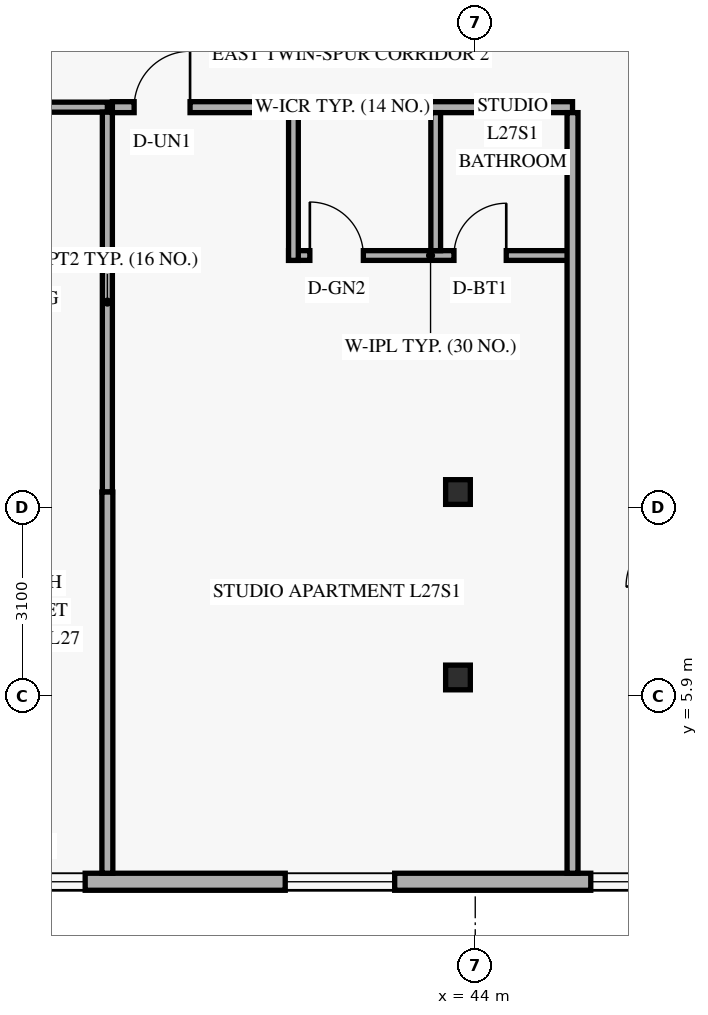
"""IFC4 building model, lengths in metres.
Left out: names, types, materials, properties, quantities, classifications, styles, units other than length and angle.
Written with IfcOpenShell. Run it as: python <this file> out.ifc"""

import sys

from ifc_helpers import new_model, si_unit, direction, frame, frame_2d, origin, origin_2d, place, context, subcontext, project, spatial, rectangle, hollow_rectangle, extrude, element, fill, save


model = new_model("IFC4")
c1 = context("Model", 3, precision=1e-05, world=origin(), true_north=direction((0.0, 1.0)))
c2 = subcontext(c1, "Body", "Model", "MODEL_VIEW")
j1 = project(units=[si_unit("LENGTHUNIT", "METRE"), si_unit("PLANEANGLEUNIT", "RADIAN")], contexts=[c1])
p1 = place(None, origin())
s1 = spatial("IfcSite", under=j1, at=p1, CompositionType="ELEMENT")
p2 = place(p1, origin())
s2 = spatial("IfcBuilding", under=s1, at=p2, CompositionType="ELEMENT")
p3 = place(p2, frame((0.0, 0.0, 106.2)))
s3 = spatial("IfcBuildingStorey", under=s2, at=p3, CompositionType="ELEMENT", Elevation=106.2)
for number, where, z_axis, x_axis in (
    (1, (43.653, 6.2, 0.0), (0.035, 0.0, 0.999), (0.0, 1.0, 0.0)),
    (2, (43.653, 9.25, 0.0), (0.035, 0.0, 0.999), (0.0, 1.0, 0.0)),
):
    element("IfcColumn", number, at=place(p3, frame(where, z_axis=z_axis, x_axis=x_axis)), inside=s3, PredefinedType="COLUMN", context=c2, shape_type="SweptSolid", body=[
        extrude(hollow_rectangle(XDim=0.406, YDim=0.406, WallThickness=0.016, at=origin_2d()), origin(), (0.0, 0.0, 1.0), 3.602),
    ])
p4 = place(p3, frame((13.42, 2.84, 0.0), z_axis=(0.0, 0.0, 1.0), x_axis=(1.0, 0.0, 0.0)))
e3 = element("IfcWall", 3, at=p4, inside=s3, PredefinedType="SOLIDWALL", context=c2, shape_type="SweptSolid", body=[
    extrude(rectangle(XDim=36.56, YDim=0.28, at=frame_2d((18.28, 0.0))), origin(), (0.0, 0.0, 1.0), 3.36),
])
p5 = place(p4, frame((3.215, 0.0, 0.85)))
e4 = element("IfcOpeningElement", 4, at=p5, cuts=e3, PredefinedType="OPENING", context=c2, shape_type="SweptSolid", body=[
    extrude(rectangle(XDim=1.8, YDim=1.6, at=frame_2d((0.9, 0.8))), frame((0.0, 0.15, 0.0), z_axis=(0.0, -1.0, 0.0), x_axis=(1.0, 0.0, 0.0)), (0.0, 0.0, 1.0), 0.3),
])
p6 = place(p4, frame((10.055, 0.0, 0.85)))
e5 = element("IfcOpeningElement", 5, at=p6, cuts=e3, PredefinedType="OPENING", context=c2, shape_type="SweptSolid", body=[
    extrude(rectangle(XDim=1.8, YDim=1.6, at=frame_2d((0.9, 0.8))), frame((0.0, 0.15, 0.0), z_axis=(0.0, -1.0, 0.0), x_axis=(1.0, 0.0, 0.0)), (0.0, 0.0, 1.0), 0.3),
])
p7 = place(p4, frame((16.94, 0.0, 0.85)))
e6 = element("IfcOpeningElement", 6, at=p7, cuts=e3, PredefinedType="OPENING", context=c2, shape_type="SweptSolid", body=[
    extrude(rectangle(XDim=1.8, YDim=1.6, at=frame_2d((0.9, 0.8))), frame((0.0, 0.15, 0.0), z_axis=(0.0, -1.0, 0.0), x_axis=(1.0, 0.0, 0.0)), (0.0, 0.0, 1.0), 0.3),
])
p8 = place(p4, frame((22.365, 0.0, 0.85)))
e7 = element("IfcOpeningElement", 7, at=p8, cuts=e3, PredefinedType="OPENING", context=c2, shape_type="SweptSolid", body=[
    extrude(rectangle(XDim=1.8, YDim=1.6, at=frame_2d((0.9, 0.8))), frame((0.0, 0.15, 0.0), z_axis=(0.0, -1.0, 0.0), x_axis=(1.0, 0.0, 0.0)), (0.0, 0.0, 1.0), 0.3),
])
p9 = place(p4, frame((27.455, 0.0, 0.85)))
e8 = element("IfcOpeningElement", 8, at=p9, cuts=e3, PredefinedType="OPENING", context=c2, shape_type="SweptSolid", body=[
    extrude(rectangle(XDim=1.8, YDim=1.6, at=frame_2d((0.9, 0.8))), frame((0.0, 0.15, 0.0), z_axis=(0.0, -1.0, 0.0), x_axis=(1.0, 0.0, 0.0)), (0.0, 0.0, 1.0), 0.3),
])
p10 = place(p4, frame((32.48, 0.0, 0.85)))
e9 = element("IfcOpeningElement", 9, at=p10, cuts=e3, PredefinedType="OPENING", context=c2, shape_type="SweptSolid", body=[
    extrude(rectangle(XDim=1.2, YDim=1.5, at=frame_2d((0.6, 0.75))), frame((0.0, 0.15, 0.0), z_axis=(0.0, -1.0, 0.0), x_axis=(1.0, 0.0, 0.0)), (0.0, 0.0, 1.0), 0.3),
])
p11 = place(p4, frame((34.37, 0.0, 0.85)))
e10 = element("IfcOpeningElement", 10, at=p11, cuts=e3, PredefinedType="OPENING", context=c2, shape_type="SweptSolid", body=[
    extrude(rectangle(XDim=1.8, YDim=1.6, at=frame_2d((0.9, 0.8))), frame((0.0, 0.15, 0.0), z_axis=(0.0, -1.0, 0.0), x_axis=(1.0, 0.0, 0.0)), (0.0, 0.0, 1.0), 0.3),
])
p12 = place(p3, frame((32.732, 15.58, 0.0), z_axis=(0.0, 0.0, 1.0), x_axis=(1.0, 0.0, 0.0)))
e11 = element("IfcWall", 11, at=p12, inside=s3, PredefinedType="PARTITIONING", context=c2, shape_type="SweptSolid", body=[
    extrude(rectangle(XDim=5.218, YDim=0.165, at=frame_2d((2.609, 0.0))), origin(), (0.0, 0.0, 1.0), 2.731),
])
p13 = place(p12, frame((2.867, 0.0, 0.0)))
e12 = element("IfcOpeningElement", 12, at=p13, cuts=e11, PredefinedType="OPENING", context=c2, shape_type="SweptSolid", body=[
    extrude(rectangle(XDim=0.95, YDim=2.15, at=frame_2d((0.475, 1.075))), frame((0.0, 0.093, 0.0), z_axis=(0.0, -1.0, 0.0), x_axis=(1.0, 0.0, 0.0)), (0.0, 0.0, 1.0), 0.185),
])
p14 = place(p3, frame((37.95, 9.25, 0.0), z_axis=(0.0, 0.0, 1.0), x_axis=(0.0, 1.0, 0.0)))
e13 = element("IfcWall", 13, at=p14, inside=s3, PredefinedType="PARTITIONING", context=c2, shape_type="SweptSolid", body=[
    extrude(rectangle(XDim=6.248, YDim=0.165, at=frame_2d((3.124, 0.0))), origin(), (0.0, 0.0, 1.0), 2.731),
])
p15 = place(p3, frame((38.032, 15.58, 0.0), z_axis=(0.0, 0.0, 1.0), x_axis=(1.0, 0.0, 0.0)))
e14 = element("IfcWall", 14, at=p15, inside=s3, PredefinedType="STANDARD", context=c2, shape_type="SweptSolid", body=[
    extrude(rectangle(XDim=7.568, YDim=0.18, at=frame_2d((3.784, 0.0))), origin(), (0.0, 0.0, 1.0), 2.731),
])
p16 = place(p15, frame((0.357, 0.0, 0.0)))
e15 = element("IfcOpeningElement", 15, at=p16, cuts=e14, PredefinedType="OPENING", context=c2, shape_type="SweptSolid", body=[
    extrude(rectangle(XDim=0.92, YDim=2.15, at=frame_2d((0.46, 1.075))), frame((0.0, 0.1, 0.0), z_axis=(0.0, -1.0, 0.0), x_axis=(1.0, 0.0, 0.0)), (0.0, 0.0, 1.0), 0.2),
])
p17 = place(p3, frame((37.95, 2.98, 0.0), z_axis=(0.0, 0.0, 1.0), x_axis=(0.0, 1.0, 0.0)))
e16 = element("IfcWall", 16, at=p17, inside=s3, PredefinedType="PARTITIONING", context=c2, shape_type="SweptSolid", body=[
    extrude(rectangle(XDim=6.27, YDim=0.18, at=frame_2d((3.135, 0.0))), origin(), (0.0, 0.0, 1.0), 2.731),
])
p18 = place(p3, frame((40.93, 13.14, 0.0), z_axis=(0.0, 0.0, 1.0), x_axis=(1.0, 0.0, 0.0)))
e17 = element("IfcWall", 17, at=p18, inside=s3, PredefinedType="PLUMBINGWALL", context=c2, shape_type="SweptSolid", body=[
    extrude(rectangle(XDim=4.67, YDim=0.16, at=frame_2d((2.335, 0.0))), origin(), (0.0, 0.0, 1.0), 2.731),
])
p19 = place(p18, frame((0.35, 0.0, 0.0)))
e18 = element("IfcOpeningElement", 18, at=p19, cuts=e17, PredefinedType="OPENING", context=c2, shape_type="SweptSolid", body=[
    extrude(rectangle(XDim=0.88, YDim=2.12, at=frame_2d((0.44, 1.06))), frame((0.0, 0.09, 0.0), z_axis=(0.0, -1.0, 0.0), x_axis=(1.0, 0.0, 0.0)), (0.0, 0.0, 1.0), 0.18),
])
p20 = place(p18, frame((2.72, 0.0, 0.0)))
e19 = element("IfcOpeningElement", 19, at=p20, cuts=e17, PredefinedType="OPENING", context=c2, shape_type="SweptSolid", body=[
    extrude(rectangle(XDim=0.86, YDim=2.12, at=frame_2d((0.43, 1.06))), frame((0.0, 0.09, 0.0), z_axis=(0.0, -1.0, 0.0), x_axis=(1.0, 0.0, 0.0)), (0.0, 0.0, 1.0), 0.18),
])
p21 = place(p3, frame((41.01, 13.06, 0.0), z_axis=(0.0, 0.0, 1.0), x_axis=(0.0, 1.0, 0.0)))
e20 = element("IfcWall", 20, at=p21, inside=s3, PredefinedType="PLUMBINGWALL", context=c2, shape_type="SweptSolid", body=[
    extrude(rectangle(XDim=2.43, YDim=0.16, at=frame_2d((1.215, 0.0))), origin(), (0.0, 0.0, 1.0), 2.988),
])
p22 = place(p3, frame((43.35, 13.22, 0.0), z_axis=(0.0, 0.0, 1.0), x_axis=(0.0, 1.0, 0.0)))
e21 = element("IfcWall", 21, at=p22, inside=s3, PredefinedType="PLUMBINGWALL", context=c2, shape_type="SweptSolid", body=[
    extrude(rectangle(XDim=2.27, YDim=0.16, at=frame_2d((1.135, 0.0))), origin(), (0.0, 0.0, 1.0), 2.988),
])
p23 = place(p3, frame((45.6, 2.98, 0.0), z_axis=(0.0, 0.0, 1.0), x_axis=(0.0, 1.0, 0.0)))
e22 = element("IfcWall", 22, at=p23, inside=s3, PredefinedType="STANDARD", context=c2, shape_type="SweptSolid", body=[
    extrude(rectangle(XDim=12.51, YDim=0.18, at=frame_2d((6.255, 0.0))), origin(), (0.0, 0.0, 1.0), 2.731),
])
p24 = place(p8, origin())
e23 = element("IfcWindow", 23, at=p24, inside=s3, PartitioningType="SINGLE_PANEL", PredefinedType="WINDOW", context=c2, shape_type="SweptSolid", body=[
    extrude(rectangle(XDim=1.8, YDim=1.6, at=frame_2d((0.9, 0.8))), frame((0.0, 0.03, 0.0), z_axis=(0.0, -1.0, 0.0), x_axis=(1.0, 0.0, 0.0)), (0.0, 0.0, 1.0), 0.06),
])
fill(e7, e23)
p25 = place(p9, origin())
e24 = element("IfcWindow", 24, at=p25, inside=s3, PartitioningType="SINGLE_PANEL", PredefinedType="WINDOW", context=c2, shape_type="SweptSolid", body=[
    extrude(rectangle(XDim=1.8, YDim=1.6, at=frame_2d((0.9, 0.8))), frame((0.0, 0.03, 0.0), z_axis=(0.0, -1.0, 0.0), x_axis=(1.0, 0.0, 0.0)), (0.0, 0.0, 1.0), 0.06),
])
fill(e8, e24)
p26 = place(p10, origin())
e25 = element("IfcWindow", 25, at=p26, inside=s3, PartitioningType="SINGLE_PANEL", PredefinedType="WINDOW", context=c2, shape_type="SweptSolid", body=[
    extrude(rectangle(XDim=1.2, YDim=1.5, at=frame_2d((0.6, 0.75))), frame((0.0, 0.03, 0.0), z_axis=(0.0, -1.0, 0.0), x_axis=(1.0, 0.0, 0.0)), (0.0, 0.0, 1.0), 0.06),
])
fill(e9, e25)
p27 = place(p16, origin())
e26 = element("IfcDoor", 26, at=p27, inside=s3, OperationType="SINGLE_SWING_RIGHT", PredefinedType="DOOR", context=c2, shape_type="SweptSolid", body=[
    extrude(rectangle(XDim=0.92, YDim=2.15, at=frame_2d((0.46, 1.075))), frame((0.0, 0.025, 0.0), z_axis=(0.0, -1.0, 0.0), x_axis=(1.0, 0.0, 0.0)), (0.0, 0.0, 1.0), 0.05),
])
fill(e15, e26)
p28 = place(p19, origin())
e27 = element("IfcDoor", 27, at=p28, inside=s3, OperationType="SINGLE_SWING_LEFT", PredefinedType="DOOR", context=c2, shape_type="SweptSolid", body=[
    extrude(rectangle(XDim=0.88, YDim=2.12, at=frame_2d((0.44, 1.06))), frame((0.0, 0.025, 0.0), z_axis=(0.0, -1.0, 0.0), x_axis=(1.0, 0.0, 0.0)), (0.0, 0.0, 1.0), 0.05),
])
fill(e18, e27)
p29 = place(p20, origin())
e28 = element("IfcDoor", 28, at=p29, inside=s3, OperationType="SINGLE_SWING_RIGHT", PredefinedType="DOOR", context=c2, shape_type="SweptSolid", body=[
    extrude(rectangle(XDim=0.86, YDim=2.12, at=frame_2d((0.43, 1.06))), frame((0.0, 0.025, 0.0), z_axis=(0.0, -1.0, 0.0), x_axis=(1.0, 0.0, 0.0)), (0.0, 0.0, 1.0), 0.05),
])
fill(e19, e28)
save(model, sys.argv[1])
